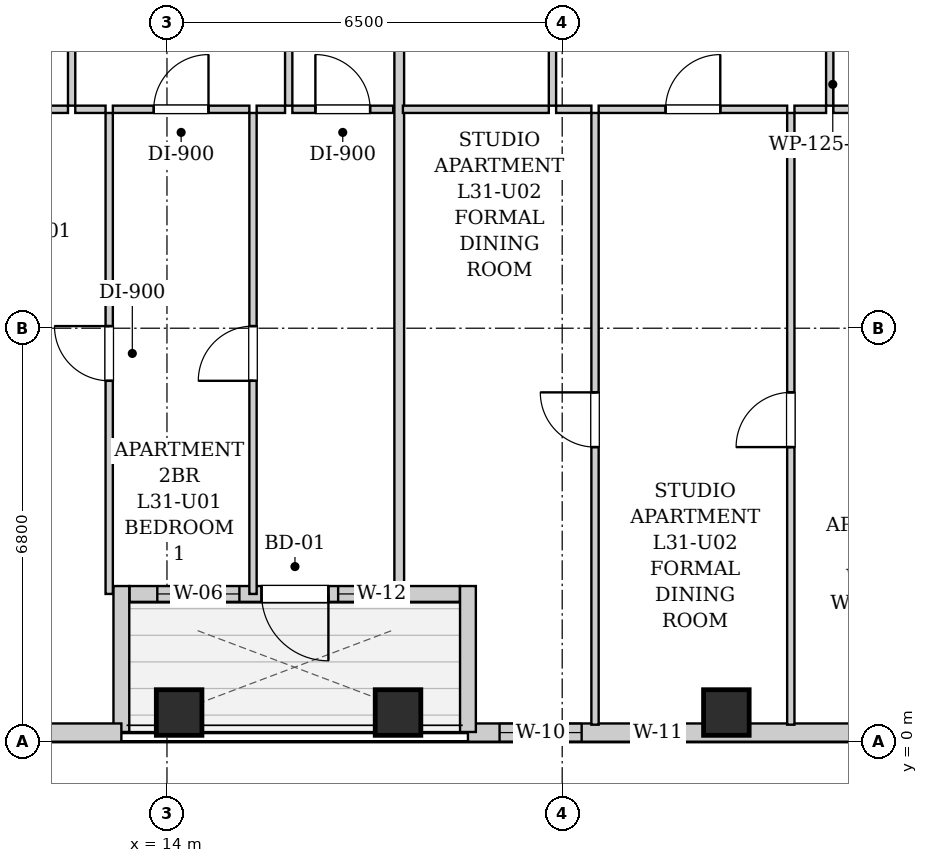
"""IFC4 building model, lengths in metres.
Left out: names, types, materials, properties, quantities, classifications, styles, units other than length and angle.
Written with IfcOpenShell. Run it as: python <this file> out.ifc"""

import sys

from ifc_helpers import new_model, si_unit, direction, frame, frame_2d, origin, origin_2d, place, context, subcontext, project, spatial, rectangle, extrude, element, fill, save


model = new_model("IFC4")
c1 = context("Model", 3, precision=1e-05, world=origin(), true_north=direction((0.0, 1.0)))
c2 = subcontext(c1, "Body", "Model", "MODEL_VIEW")
j1 = project(units=[si_unit("LENGTHUNIT", "METRE"), si_unit("PLANEANGLEUNIT", "RADIAN")], contexts=[c1])
p1 = place(None, origin())
s1 = spatial("IfcSite", under=j1, at=p1, CompositionType="ELEMENT")
p2 = place(p1, origin())
s2 = spatial("IfcBuilding", under=s1, at=p2, CompositionType="ELEMENT")
p3 = place(p2, frame((0.0, 0.0, 110.3)))
s3 = spatial("IfcBuildingStorey", under=s2, at=p3, CompositionType="ELEMENT", Elevation=110.3)
for number, where, z_axis, x_axis in (
    (1, (14.2, 0.48, 0.0), (0.0, 0.0, 1.0), (1.0, 0.0, 0.0)),
    (2, (17.8, 0.48, 0.0), (0.0, 0.0, 1.0), (1.0, 0.0, 0.0)),
    (3, (23.2, 0.48, 0.0), (0.0, 0.0, 1.0), (1.0, 0.0, 0.0)),
):
    element("IfcColumn", number, at=place(p3, frame(where, z_axis=z_axis, x_axis=x_axis)), inside=s3, PredefinedType="COLUMN", context=c2, shape_type="SweptSolid", body=[
        extrude(rectangle(XDim=0.75, YDim=0.75, at=origin_2d()), origin(), (0.0, 0.0, 1.0), 3.2),
    ])
p4 = place(p3, frame((40.9, 0.15, 0.0), z_axis=(0.0, 0.0, 1.0), x_axis=(-1.0, 0.0, 0.0)))
e4 = element("IfcWall", 4, at=p4, inside=s3, PredefinedType="SOLIDWALL", context=c2, shape_type="SweptSolid", body=[
    extrude(rectangle(XDim=21.95, YDim=0.3, at=frame_2d((10.975, 0.0))), origin(), (0.0, 0.0, 1.0), 2.94),
])
p5 = place(p4, frame((20.08, 0.0, 0.55)))
e5 = element("IfcOpeningElement", 5, at=p5, cuts=e4, PredefinedType="OPENING", context=c2, shape_type="SweptSolid", body=[
    extrude(rectangle(XDim=1.35, YDim=1.2, at=frame_2d((0.675, 0.6))), frame((0.0, 0.16, 0.0), z_axis=(0.0, -1.0, 0.0), x_axis=(1.0, 0.0, 0.0)), (0.0, 0.0, 1.0), 0.32),
])
p6 = place(p4, frame((18.4, 0.0, 0.55)))
e6 = element("IfcOpeningElement", 6, at=p6, cuts=e4, PredefinedType="OPENING", context=c2, shape_type="SweptSolid", body=[
    extrude(rectangle(XDim=0.85, YDim=1.2, at=frame_2d((0.425, 0.6))), frame((0.0, 0.16, 0.0), z_axis=(0.0, -1.0, 0.0), x_axis=(1.0, 0.0, 0.0)), (0.0, 0.0, 1.0), 0.32),
])
p7 = place(p4, frame((11.127, 0.0, 0.55)))
e7 = element("IfcOpeningElement", 7, at=p7, cuts=e4, PredefinedType="OPENING", context=c2, shape_type="SweptSolid", body=[
    extrude(rectangle(XDim=1.35, YDim=1.2, at=frame_2d((0.675, 0.6))), frame((0.0, 0.16, 0.0), z_axis=(0.0, -1.0, 0.0), x_axis=(1.0, 0.0, 0.0)), (0.0, 0.0, 1.0), 0.32),
])
p8 = place(p4, frame((8.235, 0.0, 0.55)))
e8 = element("IfcOpeningElement", 8, at=p8, cuts=e4, PredefinedType="OPENING", context=c2, shape_type="SweptSolid", body=[
    extrude(rectangle(XDim=1.35, YDim=1.2, at=frame_2d((0.675, 0.6))), frame((0.0, 0.16, 0.0), z_axis=(0.0, -1.0, 0.0), x_axis=(1.0, 0.0, 0.0)), (0.0, 0.0, 1.0), 0.32),
])
p9 = place(p4, frame((4.835, 0.0, 0.55)))
e9 = element("IfcOpeningElement", 9, at=p9, cuts=e4, PredefinedType="OPENING", context=c2, shape_type="SweptSolid", body=[
    extrude(rectangle(XDim=1.35, YDim=1.2, at=frame_2d((0.675, 0.6))), frame((0.0, 0.16, 0.0), z_axis=(0.0, -1.0, 0.0), x_axis=(1.0, 0.0, 0.0)), (0.0, 0.0, 1.0), 0.32),
])
p10 = place(p3, frame((18.95, 0.16, 0.0), z_axis=(0.0, 0.0, 1.0), x_axis=(0.0, 1.0, 0.0)))
e10 = element("IfcWall", 10, at=p10, inside=s3, PredefinedType="SOLIDWALL", context=c2, shape_type="SweptSolid", body=[
    extrude(rectangle(XDim=2.4, YDim=0.26, at=frame_2d((1.2, 0.0))), origin(), (0.0, 0.0, 1.0), 2.94),
])
p11 = place(p3, frame((18.816, 2.43, 0.0), z_axis=(0.0, 0.0, 1.0), x_axis=(-1.0, 0.0, 0.0)))
e11 = element("IfcWall", 11, at=p11, inside=s3, PredefinedType="SOLIDWALL", context=c2, shape_type="SweptSolid", body=[
    extrude(rectangle(XDim=5.432, YDim=0.26, at=frame_2d((2.716, 0.0))), origin(), (0.0, 0.0, 1.0), 2.94),
])
p12 = place(p11, frame((2.161, 0.0, 0.0)))
e12 = element("IfcOpeningElement", 12, at=p12, cuts=e11, PredefinedType="OPENING", context=c2, shape_type="SweptSolid", body=[
    extrude(rectangle(XDim=1.1, YDim=2.0, at=frame_2d((0.55, 1.0))), frame((0.0, 0.14, 0.0), z_axis=(0.0, -1.0, 0.0), x_axis=(1.0, 0.0, 0.0)), (0.0, 0.0, 1.0), 0.28),
])
p13 = place(p11, frame((3.625, 0.0, 0.85)))
e13 = element("IfcOpeningElement", 13, at=p13, cuts=e11, PredefinedType="OPENING", context=c2, shape_type="SweptSolid", body=[
    extrude(rectangle(XDim=1.35, YDim=1.65, at=frame_2d((0.675, 0.825))), frame((0.0, 0.14, 0.0), z_axis=(0.0, -1.0, 0.0), x_axis=(1.0, 0.0, 0.0)), (0.0, 0.0, 1.0), 0.28),
])
p14 = place(p11, frame((1.321, 0.0, 0.55)))
e14 = element("IfcOpeningElement", 14, at=p14, cuts=e11, PredefinedType="OPENING", context=c2, shape_type="SweptSolid", body=[
    extrude(rectangle(XDim=0.68, YDim=1.2, at=frame_2d((0.34, 0.6))), frame((0.0, 0.14, 0.0), z_axis=(0.0, -1.0, 0.0), x_axis=(1.0, 0.0, 0.0)), (0.0, 0.0, 1.0), 0.28),
])
p15 = place(p3, frame((13.25, 2.56, 0.0), z_axis=(0.0, 0.0, 1.0), x_axis=(0.0, -1.0, 0.0)))
e15 = element("IfcWall", 15, at=p15, inside=s3, PredefinedType="SOLIDWALL", context=c2, shape_type="SweptSolid", body=[
    extrude(rectangle(XDim=2.4, YDim=0.26, at=frame_2d((1.2, 0.0))), origin(), (0.0, 0.0, 1.0), 2.94),
])
p16 = place(p3, frame((13.25, 0.15, 0.0), z_axis=(0.0, 0.0, 1.0), x_axis=(-1.0, 0.0, 0.0)))
e16 = element("IfcWall", 16, at=p16, inside=s3, PredefinedType="SOLIDWALL", context=c2, shape_type="SweptSolid", body=[
    extrude(rectangle(XDim=3.25, YDim=0.3, at=frame_2d((1.625, 0.0))), origin(), (0.0, 0.0, 1.0), 2.94),
])
p17 = place(p3, frame((12.432, 10.46, 0.0), z_axis=(0.0, 0.0, 1.0), x_axis=(0.0, 1.0, 0.0)))
e17 = element("IfcWall", 17, at=p17, inside=s3, PredefinedType="PARTITIONING", context=c2, shape_type="SweptSolid", body=[
    extrude(rectangle(XDim=2.85, YDim=0.12, at=frame_2d((1.425, 0.0))), origin(), (0.0, 0.0, 1.0), 2.94),
])
p18 = place(p17, frame((0.995, 0.0, 0.0)))
e18 = element("IfcOpeningElement", 18, at=p18, cuts=e17, PredefinedType="OPENING", context=c2, shape_type="SweptSolid", body=[
    extrude(rectangle(XDim=0.86, YDim=2.05, at=frame_2d((0.43, 1.025))), frame((0.0, 0.07, 0.0), z_axis=(0.0, -1.0, 0.0), x_axis=(1.0, 0.0, 0.0)), (0.0, 0.0, 1.0), 0.14),
])
p19 = place(p3, frame((10.08, 10.4, 0.0), z_axis=(0.0, 0.0, 1.0), x_axis=(1.0, 0.0, 0.0)))
e19 = element("IfcWall", 19, at=p19, inside=s3, PredefinedType="PARTITIONING", context=c2, shape_type="SweptSolid", body=[
    extrude(rectangle(XDim=2.292, YDim=0.12, at=frame_2d((1.146, 0.0))), origin(), (0.0, 0.0, 1.0), 2.94),
])
p20 = place(p3, frame((16.002, 10.46, 0.0), z_axis=(0.0, 0.0, 1.0), x_axis=(0.0, 1.0, 0.0)))
e20 = element("IfcWall", 20, at=p20, inside=s3, PredefinedType="PARTITIONING", context=c2, shape_type="SweptSolid", body=[
    extrude(rectangle(XDim=2.85, YDim=0.12, at=frame_2d((1.425, 0.0))), origin(), (0.0, 0.0, 1.0), 2.94),
])
p21 = place(p20, frame((0.975, 0.0, 0.0)))
e21 = element("IfcOpeningElement", 21, at=p21, cuts=e20, PredefinedType="OPENING", context=c2, shape_type="SweptSolid", body=[
    extrude(rectangle(XDim=0.9, YDim=2.05, at=frame_2d((0.45, 1.025))), frame((0.0, 0.07, 0.0), z_axis=(0.0, -1.0, 0.0), x_axis=(1.0, 0.0, 0.0)), (0.0, 0.0, 1.0), 0.14),
])
p22 = place(p3, frame((12.492, 10.4, 0.0), z_axis=(0.0, 0.0, 1.0), x_axis=(1.0, 0.0, 0.0)))
e22 = element("IfcWall", 22, at=p22, inside=s3, PredefinedType="PARTITIONING", context=c2, shape_type="SweptSolid", body=[
    extrude(rectangle(XDim=0.498, YDim=0.12, at=frame_2d((0.249, 0.0))), origin(), (0.0, 0.0, 1.0), 2.94),
])
p23 = place(p3, frame((13.11, 10.4, 0.0), z_axis=(0.0, 0.0, 1.0), x_axis=(1.0, 0.0, 0.0)))
e23 = element("IfcWall", 23, at=p23, inside=s3, PredefinedType="PARTITIONING", context=c2, shape_type="SweptSolid", body=[
    extrude(rectangle(XDim=2.245, YDim=0.12, at=frame_2d((1.123, 0.0))), origin(), (0.0, 0.0, 1.0), 2.94),
])
p24 = place(p23, frame((0.673, 0.0, 0.0)))
e24 = element("IfcOpeningElement", 24, at=p24, cuts=e23, PredefinedType="OPENING", context=c2, shape_type="SweptSolid", body=[
    extrude(rectangle(XDim=0.9, YDim=2.05, at=frame_2d((0.45, 1.025))), frame((0.0, 0.07, 0.0), z_axis=(0.0, -1.0, 0.0), x_axis=(1.0, 0.0, 0.0)), (0.0, 0.0, 1.0), 0.14),
])
p25 = place(p3, frame((15.475, 10.4, 0.0), z_axis=(0.0, 0.0, 1.0), x_axis=(1.0, 0.0, 0.0)))
e25 = element("IfcWall", 25, at=p25, inside=s3, PredefinedType="PARTITIONING", context=c2, shape_type="SweptSolid", body=[
    extrude(rectangle(XDim=0.467, YDim=0.12, at=frame_2d((0.233, 0.0))), origin(), (0.0, 0.0, 1.0), 2.94),
])
p26 = place(p3, frame((16.062, 10.4, 0.0), z_axis=(0.0, 0.0, 1.0), x_axis=(1.0, 0.0, 0.0)))
e26 = element("IfcWall", 26, at=p26, inside=s3, PredefinedType="PARTITIONING", context=c2, shape_type="SweptSolid", body=[
    extrude(rectangle(XDim=1.658, YDim=0.12, at=frame_2d((0.829, 0.0))), origin(), (0.0, 0.0, 1.0), 2.94),
])
p27 = place(p26, frame((0.379, 0.0, 0.0)))
e27 = element("IfcOpeningElement", 27, at=p27, cuts=e26, PredefinedType="OPENING", context=c2, shape_type="SweptSolid", body=[
    extrude(rectangle(XDim=0.9, YDim=2.05, at=frame_2d((0.45, 1.025))), frame((0.0, 0.07, 0.0), z_axis=(0.0, -1.0, 0.0), x_axis=(1.0, 0.0, 0.0)), (0.0, 0.0, 1.0), 0.14),
])
p28 = place(p3, frame((13.05, 2.43, 0.0), z_axis=(0.0, 0.0, 1.0), x_axis=(0.0, 1.0, 0.0)))
e28 = element("IfcWall", 28, at=p28, inside=s3, PredefinedType="PARTITIONING", context=c2, shape_type="SweptSolid", body=[
    extrude(rectangle(XDim=7.91, YDim=0.12, at=frame_2d((3.955, 0.0))), origin(), (0.0, 0.0, 1.0), 2.94),
])
p29 = place(p28, frame((3.505, 0.0, 0.0)))
e29 = element("IfcOpeningElement", 29, at=p29, cuts=e28, PredefinedType="OPENING", context=c2, shape_type="SweptSolid", body=[
    extrude(rectangle(XDim=0.9, YDim=2.05, at=frame_2d((0.45, 1.025))), frame((0.0, 0.07, 0.0), z_axis=(0.0, -1.0, 0.0), x_axis=(1.0, 0.0, 0.0)), (0.0, 0.0, 1.0), 0.14),
])
p30 = place(p3, frame((15.415, 2.43, 0.0), z_axis=(0.0, 0.0, 1.0), x_axis=(0.0, 1.0, 0.0)))
e30 = element("IfcWall", 30, at=p30, inside=s3, PredefinedType="PARTITIONING", context=c2, shape_type="SweptSolid", body=[
    extrude(rectangle(XDim=7.91, YDim=0.12, at=frame_2d((3.955, 0.0))), origin(), (0.0, 0.0, 1.0), 2.94),
])
p31 = place(p30, frame((3.505, 0.0, 0.0)))
e31 = element("IfcOpeningElement", 31, at=p31, cuts=e30, PredefinedType="OPENING", context=c2, shape_type="SweptSolid", body=[
    extrude(rectangle(XDim=0.9, YDim=2.05, at=frame_2d((0.45, 1.025))), frame((0.0, 0.07, 0.0), z_axis=(0.0, -1.0, 0.0), x_axis=(1.0, 0.0, 0.0)), (0.0, 0.0, 1.0), 0.14),
])
p32 = place(p3, frame((17.82, 2.26, 0.0), z_axis=(0.0, 0.0, 1.0), x_axis=(0.0, 1.0, 0.0)))
e32 = element("IfcWall", 32, at=p32, inside=s3, PredefinedType="PARTITIONING", context=c2, shape_type="SweptSolid", body=[
    extrude(rectangle(XDim=11.05, YDim=0.16, at=frame_2d((5.525, 0.0))), origin(), (0.0, 0.0, 1.0), 2.313),
])
p33 = place(p3, frame((20.34, 10.46, 0.0), z_axis=(0.0, 0.0, 1.0), x_axis=(0.0, 1.0, 0.0)))
e33 = element("IfcWall", 33, at=p33, inside=s3, PredefinedType="PARTITIONING", context=c2, shape_type="SweptSolid", body=[
    extrude(rectangle(XDim=2.85, YDim=0.12, at=frame_2d((1.425, 0.0))), origin(), (0.0, 0.0, 1.0), 2.94),
])
p34 = place(p33, frame((0.995, 0.0, 0.0)))
e34 = element("IfcOpeningElement", 34, at=p34, cuts=e33, PredefinedType="OPENING", context=c2, shape_type="SweptSolid", body=[
    extrude(rectangle(XDim=0.86, YDim=2.05, at=frame_2d((0.43, 1.025))), frame((0.0, 0.07, 0.0), z_axis=(0.0, -1.0, 0.0), x_axis=(1.0, 0.0, 0.0)), (0.0, 0.0, 1.0), 0.14),
])
p35 = place(p3, frame((17.88, 10.4, 0.0), z_axis=(0.0, 0.0, 1.0), x_axis=(1.0, 0.0, 0.0)))
e35 = element("IfcWall", 35, at=p35, inside=s3, PredefinedType="PARTITIONING", context=c2, shape_type="SweptSolid", body=[
    extrude(rectangle(XDim=2.4, YDim=0.12, at=frame_2d((1.2, 0.0))), origin(), (0.0, 0.0, 1.0), 2.94),
])
p36 = place(p3, frame((24.9, 10.46, 0.0), z_axis=(0.0, 0.0, 1.0), x_axis=(0.0, 1.0, 0.0)))
e36 = element("IfcWall", 36, at=p36, inside=s3, PredefinedType="PARTITIONING", context=c2, shape_type="SweptSolid", body=[
    extrude(rectangle(XDim=2.85, YDim=0.12, at=frame_2d((1.425, 0.0))), origin(), (0.0, 0.0, 1.0), 2.94),
])
p37 = place(p36, frame((0.975, 0.0, 0.0)))
e37 = element("IfcOpeningElement", 37, at=p37, cuts=e36, PredefinedType="OPENING", context=c2, shape_type="SweptSolid", body=[
    extrude(rectangle(XDim=0.9, YDim=2.05, at=frame_2d((0.45, 1.025))), frame((0.0, 0.07, 0.0), z_axis=(0.0, -1.0, 0.0), x_axis=(1.0, 0.0, 0.0)), (0.0, 0.0, 1.0), 0.14),
])
p38 = place(p3, frame((20.4, 10.4, 0.0), z_axis=(0.0, 0.0, 1.0), x_axis=(1.0, 0.0, 0.0)))
e38 = element("IfcWall", 38, at=p38, inside=s3, PredefinedType="PARTITIONING", context=c2, shape_type="SweptSolid", body=[
    extrude(rectangle(XDim=0.58, YDim=0.12, at=frame_2d((0.29, 0.0))), origin(), (0.0, 0.0, 1.0), 2.94),
])
p39 = place(p3, frame((21.1, 10.4, 0.0), z_axis=(0.0, 0.0, 1.0), x_axis=(1.0, 0.0, 0.0)))
e39 = element("IfcWall", 39, at=p39, inside=s3, PredefinedType="PARTITIONING", context=c2, shape_type="SweptSolid", body=[
    extrude(rectangle(XDim=3.1, YDim=0.12, at=frame_2d((1.55, 0.0))), origin(), (0.0, 0.0, 1.0), 2.94),
])
p40 = place(p39, frame((1.1, 0.0, 0.0)))
e40 = element("IfcOpeningElement", 40, at=p40, cuts=e39, PredefinedType="OPENING", context=c2, shape_type="SweptSolid", body=[
    extrude(rectangle(XDim=0.9, YDim=2.05, at=frame_2d((0.45, 1.025))), frame((0.0, 0.07, 0.0), z_axis=(0.0, -1.0, 0.0), x_axis=(1.0, 0.0, 0.0)), (0.0, 0.0, 1.0), 0.14),
])
p41 = place(p3, frame((24.32, 10.4, 0.0), z_axis=(0.0, 0.0, 1.0), x_axis=(1.0, 0.0, 0.0)))
e41 = element("IfcWall", 41, at=p41, inside=s3, PredefinedType="PARTITIONING", context=c2, shape_type="SweptSolid", body=[
    extrude(rectangle(XDim=0.52, YDim=0.12, at=frame_2d((0.26, 0.0))), origin(), (0.0, 0.0, 1.0), 2.94),
])
p42 = place(p3, frame((24.96, 10.4, 0.0), z_axis=(0.0, 0.0, 1.0), x_axis=(1.0, 0.0, 0.0)))
e42 = element("IfcWall", 42, at=p42, inside=s3, PredefinedType="PARTITIONING", context=c2, shape_type="SweptSolid", body=[
    extrude(rectangle(XDim=2.46, YDim=0.12, at=frame_2d((1.23, 0.0))), origin(), (0.0, 0.0, 1.0), 2.94),
])
p43 = place(p42, frame((0.78, 0.0, 0.0)))
e43 = element("IfcOpeningElement", 43, at=p43, cuts=e42, PredefinedType="OPENING", context=c2, shape_type="SweptSolid", body=[
    extrude(rectangle(XDim=0.9, YDim=2.05, at=frame_2d((0.45, 1.025))), frame((0.0, 0.07, 0.0), z_axis=(0.0, -1.0, 0.0), x_axis=(1.0, 0.0, 0.0)), (0.0, 0.0, 1.0), 0.14),
])
p44 = place(p3, frame((21.04, 0.28, 0.0), z_axis=(0.0, 0.0, 1.0), x_axis=(0.0, 1.0, 0.0)))
e44 = element("IfcWall", 44, at=p44, inside=s3, PredefinedType="PARTITIONING", context=c2, shape_type="SweptSolid", body=[
    extrude(rectangle(XDim=10.06, YDim=0.12, at=frame_2d((5.03, 0.0))), origin(), (0.0, 0.0, 1.0), 2.94),
])
p45 = place(p44, frame((4.565, 0.0, 0.0)))
e45 = element("IfcOpeningElement", 45, at=p45, cuts=e44, PredefinedType="OPENING", context=c2, shape_type="SweptSolid", body=[
    extrude(rectangle(XDim=0.9, YDim=2.05, at=frame_2d((0.45, 1.025))), frame((0.0, 0.07, 0.0), z_axis=(0.0, -1.0, 0.0), x_axis=(1.0, 0.0, 0.0)), (0.0, 0.0, 1.0), 0.14),
])
p46 = place(p3, frame((24.26, 0.28, 0.0), z_axis=(0.0, 0.0, 1.0), x_axis=(0.0, 1.0, 0.0)))
e46 = element("IfcWall", 46, at=p46, inside=s3, PredefinedType="PARTITIONING", context=c2, shape_type="SweptSolid", body=[
    extrude(rectangle(XDim=10.06, YDim=0.12, at=frame_2d((5.03, 0.0))), origin(), (0.0, 0.0, 1.0), 2.94),
])
p47 = place(p46, frame((4.565, 0.0, 0.0)))
e47 = element("IfcOpeningElement", 47, at=p47, cuts=e46, PredefinedType="OPENING", context=c2, shape_type="SweptSolid", body=[
    extrude(rectangle(XDim=0.9, YDim=2.05, at=frame_2d((0.45, 1.025))), frame((0.0, 0.07, 0.0), z_axis=(0.0, -1.0, 0.0), x_axis=(1.0, 0.0, 0.0)), (0.0, 0.0, 1.0), 0.14),
])
p48 = place(p24, origin())
e48 = element("IfcDoor", 48, at=p48, inside=s3, OperationType="SINGLE_SWING_RIGHT", PredefinedType="DOOR", context=c2, shape_type="SweptSolid", body=[
    extrude(rectangle(XDim=0.9, YDim=2.05, at=frame_2d((0.45, 1.025))), frame((0.0, 0.025, 0.0), z_axis=(0.0, -1.0, 0.0), x_axis=(1.0, 0.0, 0.0)), (0.0, 0.0, 1.0), 0.05),
])
fill(e24, e48)
p49 = place(p27, origin())
e49 = element("IfcDoor", 49, at=p49, inside=s3, OperationType="SINGLE_SWING_LEFT", PredefinedType="DOOR", context=c2, shape_type="SweptSolid", body=[
    extrude(rectangle(XDim=0.9, YDim=2.05, at=frame_2d((0.45, 1.025))), frame((0.0, 0.025, 0.0), z_axis=(0.0, -1.0, 0.0), x_axis=(1.0, 0.0, 0.0)), (0.0, 0.0, 1.0), 0.05),
])
fill(e27, e49)
p50 = place(p29, origin())
e50 = element("IfcDoor", 50, at=p50, inside=s3, OperationType="SINGLE_SWING_RIGHT", PredefinedType="DOOR", context=c2, shape_type="SweptSolid", body=[
    extrude(rectangle(XDim=0.9, YDim=2.05, at=frame_2d((0.45, 1.025))), frame((0.0, 0.025, 0.0), z_axis=(0.0, -1.0, 0.0), x_axis=(1.0, 0.0, 0.0)), (0.0, 0.0, 1.0), 0.05),
])
fill(e29, e50)
p51 = place(p31, origin())
e51 = element("IfcDoor", 51, at=p51, inside=s3, OperationType="SINGLE_SWING_LEFT", PredefinedType="DOOR", context=c2, shape_type="SweptSolid", body=[
    extrude(rectangle(XDim=0.9, YDim=2.05, at=frame_2d((0.45, 1.025))), frame((0.0, 0.025, 0.0), z_axis=(0.0, -1.0, 0.0), x_axis=(1.0, 0.0, 0.0)), (0.0, 0.0, 1.0), 0.05),
])
fill(e31, e51)
p52 = place(p40, origin())
e52 = element("IfcDoor", 52, at=p52, inside=s3, OperationType="SINGLE_SWING_RIGHT", PredefinedType="DOOR", context=c2, shape_type="SweptSolid", body=[
    extrude(rectangle(XDim=0.9, YDim=2.05, at=frame_2d((0.45, 1.025))), frame((0.0, 0.025, 0.0), z_axis=(0.0, -1.0, 0.0), x_axis=(1.0, 0.0, 0.0)), (0.0, 0.0, 1.0), 0.05),
])
fill(e40, e52)
p53 = place(p45, origin())
e53 = element("IfcDoor", 53, at=p53, inside=s3, OperationType="SINGLE_SWING_RIGHT", PredefinedType="DOOR", context=c2, shape_type="SweptSolid", body=[
    extrude(rectangle(XDim=0.9, YDim=2.05, at=frame_2d((0.45, 1.025))), frame((0.0, 0.025, 0.0), z_axis=(0.0, -1.0, 0.0), x_axis=(1.0, 0.0, 0.0)), (0.0, 0.0, 1.0), 0.05),
])
fill(e45, e53)
p54 = place(p47, origin())
e54 = element("IfcDoor", 54, at=p54, inside=s3, OperationType="SINGLE_SWING_LEFT", PredefinedType="DOOR", context=c2, shape_type="SweptSolid", body=[
    extrude(rectangle(XDim=0.9, YDim=2.05, at=frame_2d((0.45, 1.025))), frame((0.0, 0.025, 0.0), z_axis=(0.0, -1.0, 0.0), x_axis=(1.0, 0.0, 0.0)), (0.0, 0.0, 1.0), 0.05),
])
fill(e47, e54)
p55 = place(p12, origin())
e55 = element("IfcDoor", 55, at=p55, inside=s3, OperationType="SINGLE_SWING_LEFT", PredefinedType="DOOR", context=c2, shape_type="SweptSolid", body=[
    extrude(rectangle(XDim=1.1, YDim=2.0, at=frame_2d((0.55, 1.0))), frame((0.0, 0.025, 0.0), z_axis=(0.0, -1.0, 0.0), x_axis=(1.0, 0.0, 0.0)), (0.0, 0.0, 1.0), 0.05),
])
fill(e12, e55)
p56 = place(p13, origin())
e56 = element("IfcWindow", 56, at=p56, inside=s3, PartitioningType="SINGLE_PANEL", PredefinedType="WINDOW", context=c2, shape_type="SweptSolid", body=[
    extrude(rectangle(XDim=1.35, YDim=1.65, at=frame_2d((0.675, 0.825))), frame((0.0, 0.03, 0.0), z_axis=(0.0, -1.0, 0.0), x_axis=(1.0, 0.0, 0.0)), (0.0, 0.0, 1.0), 0.06),
])
fill(e13, e56)
p57 = place(p14, origin())
e57 = element("IfcWindow", 57, at=p57, inside=s3, PartitioningType="SINGLE_PANEL", PredefinedType="WINDOW", context=c2, shape_type="SweptSolid", body=[
    extrude(rectangle(XDim=0.68, YDim=1.2, at=frame_2d((0.34, 0.6))), frame((0.0, 0.03, 0.0), z_axis=(0.0, -1.0, 0.0), x_axis=(1.0, 0.0, 0.0)), (0.0, 0.0, 1.0), 0.06),
])
fill(e14, e57)
p58 = place(p5, origin())
e58 = element("IfcWindow", 58, at=p58, inside=s3, PartitioningType="SINGLE_PANEL", PredefinedType="WINDOW", context=c2, shape_type="SweptSolid", body=[
    extrude(rectangle(XDim=1.35, YDim=1.2, at=frame_2d((0.675, 0.6))), frame((0.0, 0.03, 0.0), z_axis=(0.0, -1.0, 0.0), x_axis=(1.0, 0.0, 0.0)), (0.0, 0.0, 1.0), 0.06),
])
fill(e5, e58)
p59 = place(p6, origin())
e59 = element("IfcWindow", 59, at=p59, inside=s3, PartitioningType="SINGLE_PANEL", PredefinedType="WINDOW", context=c2, shape_type="SweptSolid", body=[
    extrude(rectangle(XDim=0.85, YDim=1.2, at=frame_2d((0.425, 0.6))), frame((0.0, 0.03, 0.0), z_axis=(0.0, -1.0, 0.0), x_axis=(1.0, 0.0, 0.0)), (0.0, 0.0, 1.0), 0.06),
])
fill(e6, e59)
save(model, sys.argv[1])
